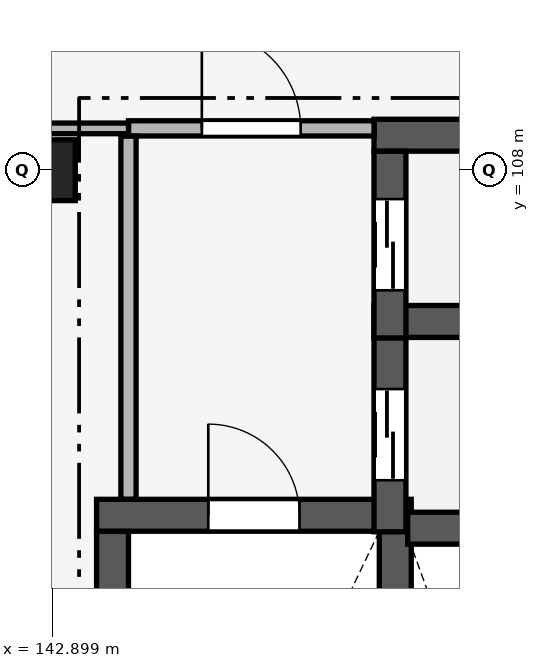
"""IFC4 building model, lengths in metres.
Left out: names, types, materials, properties, quantities, classifications, styles, units other than length and angle.
Written with IfcOpenShell. Run it as: python <this file> out.ifc"""

import sys

from ifc_helpers import new_model, si_unit, direction, frame, frame_2d, origin, origin_2d, place, context, subcontext, project, spatial, rectangle, extrude, element, fill, save


model = new_model("IFC4")
c1 = context("Model", 3, precision=1e-05, world=origin(), true_north=direction((0.0, 1.0)))
c2 = subcontext(c1, "Body", "Model", "MODEL_VIEW")
j1 = project(units=[si_unit("LENGTHUNIT", "METRE"), si_unit("PLANEANGLEUNIT", "RADIAN")], contexts=[c1])
p1 = place(None, origin())
s1 = spatial("IfcSite", under=j1, at=p1, CompositionType="ELEMENT")
p2 = place(p1, origin())
s2 = spatial("IfcBuilding", under=s1, at=p2, CompositionType="ELEMENT")
p3 = place(p2, frame((0.0, 0.0, 10.2)))
s3 = spatial("IfcBuildingStorey", under=s2, at=p3, CompositionType="ELEMENT", Elevation=10.2)
p4 = place(p3, frame((142.8, 108.0, 0.0), z_axis=(0.0, 0.0, 1.0), x_axis=(1.0, 0.0, 0.0)))
e1 = element("IfcColumn", 1, at=p4, inside=s3, PredefinedType="COLUMN", context=c2, shape_type="SweptSolid", body=[
    extrude(rectangle(XDim=0.8, YDim=0.8, at=origin_2d()), origin(), (0.0, 0.0, 1.0), 5.1),
])
p5 = place(p3, frame((143.48, 103.46, 0.0), z_axis=(0.0, 0.0, 1.0), x_axis=(1.0, 0.0, 0.0)))
e2 = element("IfcWall", 2, at=p5, inside=s3, PredefinedType="SHEAR", context=c2, shape_type="SweptSolid", body=[
    extrude(rectangle(XDim=4.14, YDim=0.42, at=frame_2d((2.07, 0.0))), origin(), (0.0, 0.0, 1.0), 4.82),
])
p6 = place(p5, frame((1.47, 0.0, 0.0)))
e3 = element("IfcOpeningElement", 3, at=p6, cuts=e2, PredefinedType="OPENING", context=c2, shape_type="SweptSolid", body=[
    extrude(rectangle(XDim=1.2, YDim=2.2, at=frame_2d((0.6, 1.1))), frame((0.0, 0.225, 0.0), z_axis=(0.0, -1.0, 0.0), x_axis=(1.0, 0.0, 0.0)), (0.0, 0.0, 1.0), 0.45),
])
for number, where, z_axis, x_axis in (
    (4, (143.69, 96.352, 0.0), (0.0, 0.0, 1.0), (0.0, 1.0, 0.0)),
    (5, (147.41, 96.352, 0.0), (0.0, 0.0, 1.0), (0.0, 1.0, 0.0)),
):
    element("IfcWall", number, at=place(p3, frame(where, z_axis=z_axis, x_axis=x_axis)), inside=s3, PredefinedType="SHEAR", context=c2, shape_type="SweptSolid", body=[
        extrude(rectangle(XDim=6.896, YDim=0.42, at=frame_2d((3.448, 0.0))), origin(), (0.0, 0.0, 1.0), 4.82),
    ])
p7 = place(p3, frame((147.573, 103.29, 0.0), z_axis=(0.0, 0.0, 1.0), x_axis=(1.0, 0.0, 0.0)))
e6 = element("IfcWall", 6, at=p7, inside=s3, PredefinedType="SHEAR", context=c2, shape_type="SweptSolid", body=[
    extrude(rectangle(XDim=2.897, YDim=0.42, at=frame_2d((1.448, 0.0))), origin(), (0.0, 0.0, 1.0), 4.82),
])
p8 = place(p3, frame((147.13, 106.01, 0.0), z_axis=(0.0, 0.0, 1.0), x_axis=(1.0, 0.0, 0.0)))
e7 = element("IfcWall", 7, at=p8, inside=s3, PredefinedType="SHEAR", context=c2, shape_type="SweptSolid", body=[
    extrude(rectangle(XDim=3.34, YDim=0.42, at=frame_2d((1.67, 0.0))), origin(), (0.0, 0.0, 1.0), 4.82),
])
p9 = place(p3, frame((147.34, 103.243, 0.0), z_axis=(0.0, 0.0, 1.0), x_axis=(0.0, 1.0, 0.0)))
e8 = element("IfcWall", 8, at=p9, inside=s3, PredefinedType="SHEAR", context=c2, shape_type="SweptSolid", body=[
    extrude(rectangle(XDim=2.555, YDim=0.42, at=frame_2d((1.278, 0.0))), origin(), (0.0, 0.0, 1.0), 4.82),
])
p10 = place(p9, frame((0.678, 0.0, 0.0)))
e9 = element("IfcOpeningElement", 9, at=p10, cuts=e8, PredefinedType="OPENING", context=c2, shape_type="SweptSolid", body=[
    extrude(rectangle(XDim=1.2, YDim=2.15, at=frame_2d((0.6, 1.075))), frame((0.0, 0.225, 0.0), z_axis=(0.0, -1.0, 0.0), x_axis=(1.0, 0.0, 0.0)), (0.0, 0.0, 1.0), 0.45),
])
p11 = place(p3, frame((147.13, 108.46, 0.0), z_axis=(0.0, 0.0, 1.0), x_axis=(1.0, 0.0, 0.0)))
e10 = element("IfcWall", 10, at=p11, inside=s3, PredefinedType="SHEAR", context=c2, shape_type="SweptSolid", body=[
    extrude(rectangle(XDim=3.68, YDim=0.42, at=frame_2d((1.84, 0.0))), origin(), (0.0, 0.0, 1.0), 4.82),
])
p12 = place(p3, frame((147.34, 105.793, 0.0), z_axis=(0.0, 0.0, 1.0), x_axis=(0.0, 1.0, 0.0)))
e11 = element("IfcWall", 11, at=p12, inside=s3, PredefinedType="SHEAR", context=c2, shape_type="SweptSolid", body=[
    extrude(rectangle(XDim=2.455, YDim=0.42, at=frame_2d((1.228, 0.0))), origin(), (0.0, 0.0, 1.0), 4.82),
])
p13 = place(p12, frame((0.627, 0.0, 0.0)))
e12 = element("IfcOpeningElement", 12, at=p13, cuts=e11, PredefinedType="OPENING", context=c2, shape_type="SweptSolid", body=[
    extrude(rectangle(XDim=1.2, YDim=2.15, at=frame_2d((0.6, 1.075))), frame((0.0, 0.225, 0.0), z_axis=(0.0, -1.0, 0.0), x_axis=(1.0, 0.0, 0.0)), (0.0, 0.0, 1.0), 0.45),
])
p14 = place(p3, frame((143.9, 108.55, 0.0), z_axis=(0.0, 0.0, 1.0), x_axis=(1.0, 0.0, 0.0)))
e13 = element("IfcWall", 13, at=p14, inside=s3, PredefinedType="PARTITIONING", context=c2, shape_type="SweptSolid", body=[
    extrude(rectangle(XDim=3.23, YDim=0.2, at=frame_2d((1.615, 0.0))), origin(), (0.0, 0.0, 1.0), 4.82),
])
p15 = place(p14, frame((0.965, 0.0, 0.0)))
e14 = element("IfcOpeningElement", 14, at=p15, cuts=e13, PredefinedType="OPENING", context=c2, shape_type="SweptSolid", body=[
    extrude(rectangle(XDim=1.3, YDim=2.2, at=frame_2d((0.65, 1.1))), frame((0.0, 0.115, 0.0), z_axis=(0.0, -1.0, 0.0), x_axis=(1.0, 0.0, 0.0)), (0.0, 0.0, 1.0), 0.23),
])
p16 = place(p3, frame((142.405, 108.55, 0.0), z_axis=(0.0, 0.0, 1.0), x_axis=(1.0, 0.0, 0.0)))
e15 = element("IfcWall", 15, at=p16, inside=s3, PredefinedType="PARTITIONING", context=c2, shape_type="SweptSolid", body=[
    extrude(rectangle(XDim=1.495, YDim=0.14, at=frame_2d((0.748, 0.0))), origin(), (0.0, 0.0, 1.0), 4.27),
])
p17 = place(p3, frame((143.9, 103.672, 0.0), z_axis=(0.0, 0.0, 1.0), x_axis=(0.0, 1.0, 0.0)))
e16 = element("IfcWall", 16, at=p17, inside=s3, PredefinedType="PARTITIONING", context=c2, shape_type="SweptSolid", body=[
    extrude(rectangle(XDim=4.776, YDim=0.2, at=frame_2d((2.388, 0.0))), origin(), (0.0, 0.0, 1.0), 4.82),
])
p18 = place(p6, origin())
e17 = element("IfcDoor", 17, at=p18, inside=s3, OperationType="SINGLE_SWING_LEFT", PredefinedType="DOOR", context=c2, shape_type="SweptSolid", body=[
    extrude(rectangle(XDim=1.2, YDim=2.2, at=frame_2d((0.6, 1.1))), frame((0.0, 0.025, 0.0), z_axis=(0.0, -1.0, 0.0), x_axis=(1.0, 0.0, 0.0)), (0.0, 0.0, 1.0), 0.05),
])
fill(e3, e17)
p19 = place(p10, origin())
e18 = element("IfcDoor", 18, at=p19, inside=s3, OperationType="DOUBLE_DOOR_SLIDING", PredefinedType="DOOR", context=c2, shape_type="SweptSolid", body=[
    extrude(rectangle(XDim=1.2, YDim=2.15, at=frame_2d((0.6, 1.075))), frame((0.0, 0.025, 0.0), z_axis=(0.0, -1.0, 0.0), x_axis=(1.0, 0.0, 0.0)), (0.0, 0.0, 1.0), 0.05),
])
fill(e9, e18)
p20 = place(p13, origin())
e19 = element("IfcDoor", 19, at=p20, inside=s3, OperationType="DOUBLE_DOOR_SLIDING", PredefinedType="DOOR", context=c2, shape_type="SweptSolid", body=[
    extrude(rectangle(XDim=1.2, YDim=2.15, at=frame_2d((0.6, 1.075))), frame((0.0, 0.025, 0.0), z_axis=(0.0, -1.0, 0.0), x_axis=(1.0, 0.0, 0.0)), (0.0, 0.0, 1.0), 0.05),
])
fill(e12, e19)
p21 = place(p15, origin())
e20 = element("IfcDoor", 20, at=p21, inside=s3, OperationType="SINGLE_SWING_LEFT", PredefinedType="DOOR", context=c2, shape_type="SweptSolid", body=[
    extrude(rectangle(XDim=1.3, YDim=2.2, at=frame_2d((0.65, 1.1))), frame((0.0, 0.025, 0.0), z_axis=(0.0, -1.0, 0.0), x_axis=(1.0, 0.0, 0.0)), (0.0, 0.0, 1.0), 0.05),
])
fill(e14, e20)
save(model, sys.argv[1])
